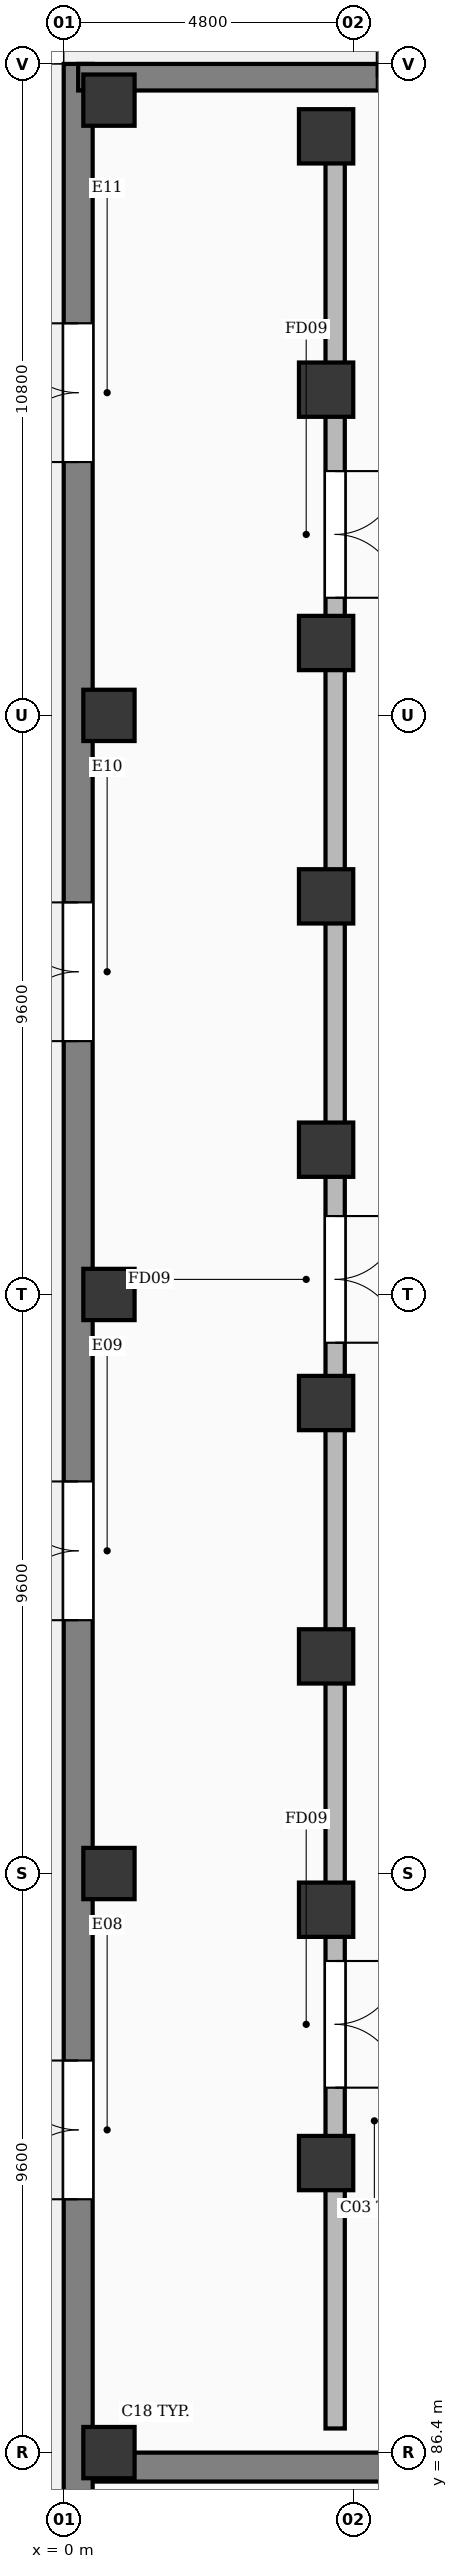
"""IFC4 building model, lengths in metres.
Left out: names, types, materials, properties, quantities, classifications, styles, units other than length and angle.
Written with IfcOpenShell. Run it as: python <this file> out.ifc"""

import sys

from ifc_helpers import new_model, si_unit, direction, frame, frame_2d, origin, origin_2d, place, context, subcontext, project, spatial, rectangle, extrude, element, fill, save


model = new_model("IFC4")
c1 = context("Model", 3, precision=1e-05, world=origin(), true_north=direction((0.0, 1.0)))
c2 = subcontext(c1, "Body", "Model", "MODEL_VIEW")
j1 = project(units=[si_unit("LENGTHUNIT", "METRE"), si_unit("PLANEANGLEUNIT", "RADIAN")], contexts=[c1])
p1 = place(None, origin())
s1 = spatial("IfcSite", under=j1, at=p1, CompositionType="ELEMENT")
p2 = place(p1, origin())
s2 = spatial("IfcBuilding", under=s1, at=p2, CompositionType="ELEMENT")
p3 = place(p2, origin())
s3 = spatial("IfcBuildingStorey", under=s2, at=p3, CompositionType="ELEMENT", Elevation=0.0)
p4 = place(p3, frame((0.75, 86.4, 0.0), z_axis=(0.0, 0.0, 1.0), x_axis=(1.0, 0.0, 0.0)))
e1 = element("IfcColumn", 1, at=p4, inside=s3, PredefinedType="COLUMN", context=c2, shape_type="SweptSolid", body=[
    extrude(rectangle(XDim=0.85, YDim=0.85, at=origin_2d()), origin(), (0.0, 0.0, 1.0), 6.0),
])
for number, where, z_axis, x_axis in (
    (2, (4.35, 91.2, 0.0), (0.0, 0.0, 1.0), (1.0, 0.0, 0.0)),
    (3, (4.35, 95.4, 0.0), (0.0, 0.0, 1.0), (1.0, 0.0, 0.0)),
    (4, (4.35, 99.6, 0.0), (0.0, 0.0, 1.0), (1.0, 0.0, 0.0)),
    (5, (4.35, 103.8, 0.0), (0.0, 0.0, 1.0), (1.0, 0.0, 0.0)),
    (6, (4.35, 108.0, 0.0), (0.0, 0.0, 1.0), (1.0, 0.0, 0.0)),
    (7, (4.35, 112.2, 0.0), (0.0, 0.0, 1.0), (1.0, 0.0, 0.0)),
    (8, (4.35, 116.4, 0.0), (0.0, 0.0, 1.0), (1.0, 0.0, 0.0)),
    (9, (4.35, 120.6, 0.0), (0.0, 0.0, 1.0), (1.0, 0.0, 0.0)),
    (10, (4.35, 124.8, 0.0), (0.0, 0.0, 1.0), (1.0, 0.0, 0.0)),
):
    element("IfcColumn", number, at=place(p3, frame(where, z_axis=z_axis, x_axis=x_axis)), inside=s3, PredefinedType="COLUMN", context=c2, shape_type="SweptSolid", body=[
        extrude(rectangle(XDim=0.9, YDim=0.9, at=origin_2d()), origin(), (0.0, 0.0, 1.0), 6.0),
    ])
for number, where, z_axis, x_axis in (
    (11, (0.75, 96.0, 0.0), (0.0, 0.0, 1.0), (1.0, 0.0, 0.0)),
    (12, (0.75, 105.6, 0.0), (0.0, 0.0, 1.0), (1.0, 0.0, 0.0)),
    (13, (0.75, 115.2, 0.0), (0.0, 0.0, 1.0), (1.0, 0.0, 0.0)),
    (14, (0.75, 125.4, 0.0), (0.0, 0.0, 1.0), (1.0, 0.0, 0.0)),
):
    element("IfcColumn", number, at=place(p3, frame(where, z_axis=z_axis, x_axis=x_axis)), inside=s3, PredefinedType="COLUMN", context=c2, shape_type="SweptSolid", body=[
        extrude(rectangle(XDim=0.85, YDim=0.85, at=origin_2d()), origin(), (0.0, 0.0, 1.0), 6.0),
    ])
p5 = place(p3, frame((0.24, 33.6, 0.0), z_axis=(0.0, 0.0, 1.0), x_axis=(0.0, 1.0, 0.0)))
e15 = element("IfcWall", 15, at=p5, inside=s3, PredefinedType="SOLIDWALL", context=c2, shape_type="SweptSolid", body=[
    extrude(rectangle(XDim=92.4, YDim=0.48, at=frame_2d((46.2, 0.0))), origin(), (0.0, 0.0, 1.0), 6.0),
])
p6 = place(p5, frame((4.2, 0.0, 0.0)))
e16 = element("IfcOpeningElement", 16, at=p6, cuts=e15, PredefinedType="OPENING", context=c2, shape_type="SweptSolid", body=[
    extrude(rectangle(XDim=2.3, YDim=2.4, at=frame_2d((1.15, 1.2))), frame((0.0, 0.252, 0.0), z_axis=(0.0, -1.0, 0.0), x_axis=(1.0, 0.0, 0.0)), (0.0, 0.0, 1.0), 0.504),
])
p7 = place(p5, frame((10.35, 0.0, 0.0)))
e17 = element("IfcOpeningElement", 17, at=p7, cuts=e15, PredefinedType="OPENING", context=c2, shape_type="SweptSolid", body=[
    extrude(rectangle(XDim=2.3, YDim=2.4, at=frame_2d((1.15, 1.2))), frame((0.0, 0.252, 0.0), z_axis=(0.0, -1.0, 0.0), x_axis=(1.0, 0.0, 0.0)), (0.0, 0.0, 1.0), 0.504),
])
p8 = place(p5, frame((19.9, 0.0, 0.0)))
e18 = element("IfcOpeningElement", 18, at=p8, cuts=e15, PredefinedType="OPENING", context=c2, shape_type="SweptSolid", body=[
    extrude(rectangle(XDim=2.3, YDim=2.4, at=frame_2d((1.15, 1.2))), frame((0.0, 0.252, 0.0), z_axis=(0.0, -1.0, 0.0), x_axis=(1.0, 0.0, 0.0)), (0.0, 0.0, 1.0), 0.504),
])
p9 = place(p5, frame((23.8, 0.0, 0.0)))
e19 = element("IfcOpeningElement", 19, at=p9, cuts=e15, PredefinedType="OPENING", context=c2, shape_type="SweptSolid", body=[
    extrude(rectangle(XDim=2.3, YDim=2.4, at=frame_2d((1.15, 1.2))), frame((0.0, 0.252, 0.0), z_axis=(0.0, -1.0, 0.0), x_axis=(1.0, 0.0, 0.0)), (0.0, 0.0, 1.0), 0.504),
])
p10 = place(p5, frame((33.4, 0.0, 0.0)))
e20 = element("IfcOpeningElement", 20, at=p10, cuts=e15, PredefinedType="OPENING", context=c2, shape_type="SweptSolid", body=[
    extrude(rectangle(XDim=2.3, YDim=2.4, at=frame_2d((1.15, 1.2))), frame((0.0, 0.252, 0.0), z_axis=(0.0, -1.0, 0.0), x_axis=(1.0, 0.0, 0.0)), (0.0, 0.0, 1.0), 0.504),
])
p11 = place(p5, frame((42.6, 0.0, 0.0)))
e21 = element("IfcOpeningElement", 21, at=p11, cuts=e15, PredefinedType="OPENING", context=c2, shape_type="SweptSolid", body=[
    extrude(rectangle(XDim=2.3, YDim=2.4, at=frame_2d((1.15, 1.2))), frame((0.0, 0.252, 0.0), z_axis=(0.0, -1.0, 0.0), x_axis=(1.0, 0.0, 0.0)), (0.0, 0.0, 1.0), 0.504),
])
p12 = place(p5, frame((48.8, 0.0, 0.0)))
e22 = element("IfcOpeningElement", 22, at=p12, cuts=e15, PredefinedType="OPENING", context=c2, shape_type="SweptSolid", body=[
    extrude(rectangle(XDim=2.3, YDim=2.4, at=frame_2d((1.15, 1.2))), frame((0.0, 0.252, 0.0), z_axis=(0.0, -1.0, 0.0), x_axis=(1.0, 0.0, 0.0)), (0.0, 0.0, 1.0), 0.504),
])
p13 = place(p5, frame((57.0, 0.0, 0.0)))
e23 = element("IfcOpeningElement", 23, at=p13, cuts=e15, PredefinedType="OPENING", context=c2, shape_type="SweptSolid", body=[
    extrude(rectangle(XDim=2.3, YDim=2.4, at=frame_2d((1.15, 1.2))), frame((0.0, 0.252, 0.0), z_axis=(0.0, -1.0, 0.0), x_axis=(1.0, 0.0, 0.0)), (0.0, 0.0, 1.0), 0.504),
])
p14 = place(p5, frame((66.6, 0.0, 0.0)))
e24 = element("IfcOpeningElement", 24, at=p14, cuts=e15, PredefinedType="OPENING", context=c2, shape_type="SweptSolid", body=[
    extrude(rectangle(XDim=2.3, YDim=2.4, at=frame_2d((1.15, 1.2))), frame((0.0, 0.252, 0.0), z_axis=(0.0, -1.0, 0.0), x_axis=(1.0, 0.0, 0.0)), (0.0, 0.0, 1.0), 0.504),
])
p15 = place(p5, frame((76.2, 0.0, 0.0)))
e25 = element("IfcOpeningElement", 25, at=p15, cuts=e15, PredefinedType="OPENING", context=c2, shape_type="SweptSolid", body=[
    extrude(rectangle(XDim=2.3, YDim=2.4, at=frame_2d((1.15, 1.2))), frame((0.0, 0.252, 0.0), z_axis=(0.0, -1.0, 0.0), x_axis=(1.0, 0.0, 0.0)), (0.0, 0.0, 1.0), 0.504),
])
p16 = place(p5, frame((85.8, 0.0, 0.0)))
e26 = element("IfcOpeningElement", 26, at=p16, cuts=e15, PredefinedType="OPENING", context=c2, shape_type="SweptSolid", body=[
    extrude(rectangle(XDim=2.3, YDim=2.4, at=frame_2d((1.15, 1.2))), frame((0.0, 0.252, 0.0), z_axis=(0.0, -1.0, 0.0), x_axis=(1.0, 0.0, 0.0)), (0.0, 0.0, 1.0), 0.504),
])
p17 = place(p5, frame((14.4, 0.0, 1.1)))
e27 = element("IfcOpeningElement", 27, at=p17, cuts=e15, PredefinedType="OPENING", context=c2, shape_type="SweptSolid", body=[
    extrude(rectangle(XDim=1.6, YDim=2.8, at=frame_2d((0.8, 1.4))), frame((0.0, 0.252, 0.0), z_axis=(0.0, -1.0, 0.0), x_axis=(1.0, 0.0, 0.0)), (0.0, 0.0, 1.0), 0.504),
])
p18 = place(p5, frame((29.65, 0.0, 1.1)))
e28 = element("IfcOpeningElement", 28, at=p18, cuts=e15, PredefinedType="OPENING", context=c2, shape_type="SweptSolid", body=[
    extrude(rectangle(XDim=2.0, YDim=2.8, at=frame_2d((1.0, 1.4))), frame((0.0, 0.252, 0.0), z_axis=(0.0, -1.0, 0.0), x_axis=(1.0, 0.0, 0.0)), (0.0, 0.0, 1.0), 0.504),
])
p19 = place(p5, frame((39.25, 0.0, 1.1)))
e29 = element("IfcOpeningElement", 29, at=p19, cuts=e15, PredefinedType="OPENING", context=c2, shape_type="SweptSolid", body=[
    extrude(rectangle(XDim=2.4, YDim=3.0, at=frame_2d((1.2, 1.5))), frame((0.0, 0.252, 0.0), z_axis=(0.0, -1.0, 0.0), x_axis=(1.0, 0.0, 0.0)), (0.0, 0.0, 1.0), 0.504),
])
p20 = place(p3, frame((0.24, 125.78, 0.0), z_axis=(0.0, 0.0, 1.0), x_axis=(1.0, 0.0, 0.0)))
e30 = element("IfcWall", 30, at=p20, inside=s3, PredefinedType="SOLIDWALL", context=c2, shape_type="SweptSolid", body=[
    extrude(rectangle(XDim=57.14, YDim=0.44, at=frame_2d((28.57, 0.0))), origin(), (0.0, 0.0, 1.0), 6.0),
])
p21 = place(p20, frame((4.95, 0.0, 0.0)))
e31 = element("IfcOpeningElement", 31, at=p21, cuts=e30, PredefinedType="OPENING", context=c2, shape_type="SweptSolid", body=[
    extrude(rectangle(XDim=2.3, YDim=2.4, at=frame_2d((1.15, 1.2))), frame((0.0, 0.232, 0.0), z_axis=(0.0, -1.0, 0.0), x_axis=(1.0, 0.0, 0.0)), (0.0, 0.0, 1.0), 0.464),
])
p22 = place(p20, frame((8.0, 0.0, 0.0)))
e32 = element("IfcOpeningElement", 32, at=p22, cuts=e30, PredefinedType="OPENING", context=c2, shape_type="SweptSolid", body=[
    extrude(rectangle(XDim=2.3, YDim=2.4, at=frame_2d((1.15, 1.2))), frame((0.0, 0.232, 0.0), z_axis=(0.0, -1.0, 0.0), x_axis=(1.0, 0.0, 0.0)), (0.0, 0.0, 1.0), 0.464),
])
p23 = place(p20, frame((12.8, 0.0, 0.0)))
e33 = element("IfcOpeningElement", 33, at=p23, cuts=e30, PredefinedType="OPENING", context=c2, shape_type="SweptSolid", body=[
    extrude(rectangle(XDim=2.3, YDim=2.4, at=frame_2d((1.15, 1.2))), frame((0.0, 0.232, 0.0), z_axis=(0.0, -1.0, 0.0), x_axis=(1.0, 0.0, 0.0)), (0.0, 0.0, 1.0), 0.464),
])
p24 = place(p20, frame((17.6, 0.0, 0.0)))
e34 = element("IfcOpeningElement", 34, at=p24, cuts=e30, PredefinedType="OPENING", context=c2, shape_type="SweptSolid", body=[
    extrude(rectangle(XDim=2.3, YDim=2.4, at=frame_2d((1.15, 1.2))), frame((0.0, 0.232, 0.0), z_axis=(0.0, -1.0, 0.0), x_axis=(1.0, 0.0, 0.0)), (0.0, 0.0, 1.0), 0.464),
])
p25 = place(p20, frame((22.4, 0.0, 0.0)))
e35 = element("IfcOpeningElement", 35, at=p25, cuts=e30, PredefinedType="OPENING", context=c2, shape_type="SweptSolid", body=[
    extrude(rectangle(XDim=2.3, YDim=2.4, at=frame_2d((1.15, 1.2))), frame((0.0, 0.232, 0.0), z_axis=(0.0, -1.0, 0.0), x_axis=(1.0, 0.0, 0.0)), (0.0, 0.0, 1.0), 0.464),
])
p26 = place(p20, frame((27.2, 0.0, 0.0)))
e36 = element("IfcOpeningElement", 36, at=p26, cuts=e30, PredefinedType="OPENING", context=c2, shape_type="SweptSolid", body=[
    extrude(rectangle(XDim=2.3, YDim=2.4, at=frame_2d((1.15, 1.2))), frame((0.0, 0.232, 0.0), z_axis=(0.0, -1.0, 0.0), x_axis=(1.0, 0.0, 0.0)), (0.0, 0.0, 1.0), 0.464),
])
p27 = place(p20, frame((32.0, 0.0, 0.0)))
e37 = element("IfcOpeningElement", 37, at=p27, cuts=e30, PredefinedType="OPENING", context=c2, shape_type="SweptSolid", body=[
    extrude(rectangle(XDim=2.3, YDim=2.4, at=frame_2d((1.15, 1.2))), frame((0.0, 0.232, 0.0), z_axis=(0.0, -1.0, 0.0), x_axis=(1.0, 0.0, 0.0)), (0.0, 0.0, 1.0), 0.464),
])
p28 = place(p20, frame((36.8, 0.0, 0.0)))
e38 = element("IfcOpeningElement", 38, at=p28, cuts=e30, PredefinedType="OPENING", context=c2, shape_type="SweptSolid", body=[
    extrude(rectangle(XDim=2.3, YDim=2.4, at=frame_2d((1.15, 1.2))), frame((0.0, 0.232, 0.0), z_axis=(0.0, -1.0, 0.0), x_axis=(1.0, 0.0, 0.0)), (0.0, 0.0, 1.0), 0.464),
])
p29 = place(p20, frame((51.2, 0.0, 0.0)))
e39 = element("IfcOpeningElement", 39, at=p29, cuts=e30, PredefinedType="OPENING", context=c2, shape_type="SweptSolid", body=[
    extrude(rectangle(XDim=2.3, YDim=2.4, at=frame_2d((1.15, 1.2))), frame((0.0, 0.232, 0.0), z_axis=(0.0, -1.0, 0.0), x_axis=(1.0, 0.0, 0.0)), (0.0, 0.0, 1.0), 0.464),
])
p30 = place(p20, frame((43.0, 0.0, 0.0)))
e40 = element("IfcOpeningElement", 40, at=p30, cuts=e30, PredefinedType="OPENING", context=c2, shape_type="SweptSolid", body=[
    extrude(rectangle(XDim=4.2, YDim=4.1, at=frame_2d((2.1, 2.05))), frame((0.0, 0.232, 0.0), z_axis=(0.0, -1.0, 0.0), x_axis=(1.0, 0.0, 0.0)), (0.0, 0.0, 1.0), 0.464),
])
p31 = place(p3, frame((0.5, 86.16, 0.0), z_axis=(0.0, 0.0, 1.0), x_axis=(1.0, 0.0, 0.0)))
e41 = element("IfcWall", 41, at=p31, inside=s3, PredefinedType="SOLIDWALL", context=c2, shape_type="SweptSolid", body=[
    extrude(rectangle(XDim=56.7, YDim=0.48, at=frame_2d((28.35, 0.0))), origin(), (0.0, 0.0, 1.0), 6.0),
])
p32 = place(p3, frame((4.5, 86.8, 0.0), z_axis=(0.0, 0.0, 1.0), x_axis=(0.0, 1.0, 0.0)))
e42 = element("IfcWall", 42, at=p32, inside=s3, PredefinedType="SOLIDWALL", context=c2, shape_type="SweptSolid", body=[
    extrude(rectangle(XDim=37.8, YDim=0.32, at=frame_2d((18.9, 0.0))), origin(), (0.0, 0.0, 1.0), 4.592),
])
p33 = place(p32, frame((5.65, 0.0, 0.0)))
e43 = element("IfcOpeningElement", 43, at=p33, cuts=e42, PredefinedType="OPENING", context=c2, shape_type="SweptSolid", body=[
    extrude(rectangle(XDim=2.1, YDim=2.4, at=frame_2d((1.05, 1.2))), frame((0.0, 0.172, 0.0), z_axis=(0.0, -1.0, 0.0), x_axis=(1.0, 0.0, 0.0)), (0.0, 0.0, 1.0), 0.344),
])
p34 = place(p32, frame((18.0, 0.0, 0.0)))
e44 = element("IfcOpeningElement", 44, at=p34, cuts=e42, PredefinedType="OPENING", context=c2, shape_type="SweptSolid", body=[
    extrude(rectangle(XDim=2.1, YDim=2.4, at=frame_2d((1.05, 1.2))), frame((0.0, 0.172, 0.0), z_axis=(0.0, -1.0, 0.0), x_axis=(1.0, 0.0, 0.0)), (0.0, 0.0, 1.0), 0.344),
])
p35 = place(p32, frame((30.35, 0.0, 0.0)))
e45 = element("IfcOpeningElement", 45, at=p35, cuts=e42, PredefinedType="OPENING", context=c2, shape_type="SweptSolid", body=[
    extrude(rectangle(XDim=2.1, YDim=2.4, at=frame_2d((1.05, 1.2))), frame((0.0, 0.172, 0.0), z_axis=(0.0, -1.0, 0.0), x_axis=(1.0, 0.0, 0.0)), (0.0, 0.0, 1.0), 0.344),
])
p36 = place(p13, origin())
e46 = element("IfcDoor", 46, at=p36, inside=s3, OperationType="DOUBLE_DOOR_SINGLE_SWING", PredefinedType="DOOR", context=c2, shape_type="SweptSolid", body=[
    extrude(rectangle(XDim=2.3, YDim=2.4, at=frame_2d((1.15, 1.2))), frame((0.0, 0.025, 0.0), z_axis=(0.0, -1.0, 0.0), x_axis=(1.0, 0.0, 0.0)), (0.0, 0.0, 1.0), 0.05),
])
fill(e23, e46)
p37 = place(p14, origin())
e47 = element("IfcDoor", 47, at=p37, inside=s3, OperationType="DOUBLE_DOOR_SINGLE_SWING", PredefinedType="DOOR", context=c2, shape_type="SweptSolid", body=[
    extrude(rectangle(XDim=2.3, YDim=2.4, at=frame_2d((1.15, 1.2))), frame((0.0, 0.025, 0.0), z_axis=(0.0, -1.0, 0.0), x_axis=(1.0, 0.0, 0.0)), (0.0, 0.0, 1.0), 0.05),
])
fill(e24, e47)
p38 = place(p15, origin())
e48 = element("IfcDoor", 48, at=p38, inside=s3, OperationType="DOUBLE_DOOR_SINGLE_SWING", PredefinedType="DOOR", context=c2, shape_type="SweptSolid", body=[
    extrude(rectangle(XDim=2.3, YDim=2.4, at=frame_2d((1.15, 1.2))), frame((0.0, 0.025, 0.0), z_axis=(0.0, -1.0, 0.0), x_axis=(1.0, 0.0, 0.0)), (0.0, 0.0, 1.0), 0.05),
])
fill(e25, e48)
p39 = place(p16, origin())
e49 = element("IfcDoor", 49, at=p39, inside=s3, OperationType="DOUBLE_DOOR_SINGLE_SWING", PredefinedType="DOOR", context=c2, shape_type="SweptSolid", body=[
    extrude(rectangle(XDim=2.3, YDim=2.4, at=frame_2d((1.15, 1.2))), frame((0.0, 0.025, 0.0), z_axis=(0.0, -1.0, 0.0), x_axis=(1.0, 0.0, 0.0)), (0.0, 0.0, 1.0), 0.05),
])
fill(e26, e49)
p40 = place(p21, origin())
e50 = element("IfcDoor", 50, at=p40, inside=s3, OperationType="DOUBLE_DOOR_SINGLE_SWING", PredefinedType="DOOR", context=c2, shape_type="SweptSolid", body=[
    extrude(rectangle(XDim=2.3, YDim=2.4, at=frame_2d((1.15, 1.2))), frame((0.0, 0.025, 0.0), z_axis=(0.0, -1.0, 0.0), x_axis=(1.0, 0.0, 0.0)), (0.0, 0.0, 1.0), 0.05),
])
fill(e31, e50)
p41 = place(p33, frame((2.1, 0.0, 0.0), z_axis=(0.0, 0.0, 1.0), x_axis=(-1.0, 0.0, 0.0)))
e51 = element("IfcDoor", 51, at=p41, inside=s3, OperationType="DOUBLE_DOOR_SINGLE_SWING", PredefinedType="DOOR", context=c2, shape_type="SweptSolid", body=[
    extrude(rectangle(XDim=2.1, YDim=2.4, at=frame_2d((1.05, 1.2))), frame((0.0, 0.025, 0.0), z_axis=(0.0, -1.0, 0.0), x_axis=(1.0, 0.0, 0.0)), (0.0, 0.0, 1.0), 0.05),
])
fill(e43, e51)
p42 = place(p34, frame((2.1, 0.0, 0.0), z_axis=(0.0, 0.0, 1.0), x_axis=(-1.0, 0.0, 0.0)))
e52 = element("IfcDoor", 52, at=p42, inside=s3, OperationType="DOUBLE_DOOR_SINGLE_SWING", PredefinedType="DOOR", context=c2, shape_type="SweptSolid", body=[
    extrude(rectangle(XDim=2.1, YDim=2.4, at=frame_2d((1.05, 1.2))), frame((0.0, 0.025, 0.0), z_axis=(0.0, -1.0, 0.0), x_axis=(1.0, 0.0, 0.0)), (0.0, 0.0, 1.0), 0.05),
])
fill(e44, e52)
p43 = place(p35, frame((2.1, 0.0, 0.0), z_axis=(0.0, 0.0, 1.0), x_axis=(-1.0, 0.0, 0.0)))
e53 = element("IfcDoor", 53, at=p43, inside=s3, OperationType="DOUBLE_DOOR_SINGLE_SWING", PredefinedType="DOOR", context=c2, shape_type="SweptSolid", body=[
    extrude(rectangle(XDim=2.1, YDim=2.4, at=frame_2d((1.05, 1.2))), frame((0.0, 0.025, 0.0), z_axis=(0.0, -1.0, 0.0), x_axis=(1.0, 0.0, 0.0)), (0.0, 0.0, 1.0), 0.05),
])
fill(e45, e53)
save(model, sys.argv[1])
